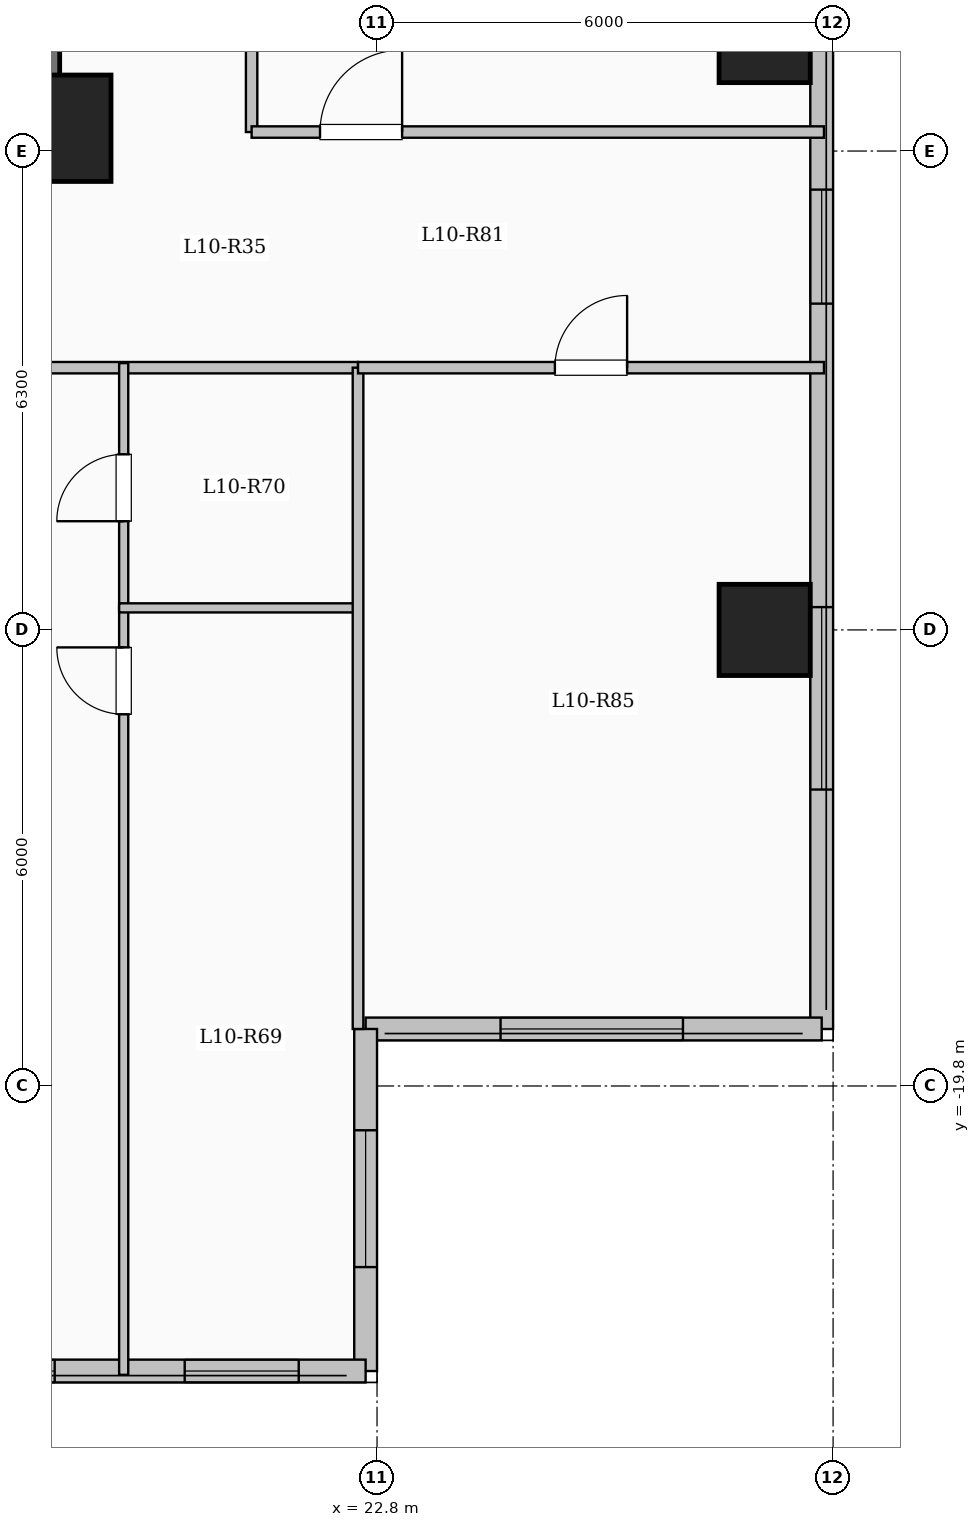
"""IFC4 building model, lengths in metres.
Left out: names, types, materials, properties, quantities, classifications, styles, units other than length and angle.
Written with IfcOpenShell. Run it as: python <this file> out.ifc"""

import sys

from ifc_helpers import new_model, si_unit, direction, frame, frame_2d, origin, origin_2d, place, context, subcontext, project, spatial, rectangle, extrude, element, fill, save


model = new_model("IFC4")
c1 = context("Model", 3, precision=1e-05, world=origin(), true_north=direction((0.0, 1.0)))
c2 = subcontext(c1, "Body", "Model", "MODEL_VIEW")
j1 = project(units=[si_unit("LENGTHUNIT", "METRE"), si_unit("PLANEANGLEUNIT", "RADIAN")], contexts=[c1])
p1 = place(None, origin())
s1 = spatial("IfcSite", under=j1, at=p1, CompositionType="ELEMENT")
p2 = place(p1, origin())
s2 = spatial("IfcBuilding", under=s1, at=p2, CompositionType="ELEMENT")
p3 = place(p2, frame((0.0, 0.0, 40.75)))
s3 = spatial("IfcBuildingStorey", under=s2, at=p3, CompositionType="ELEMENT", Elevation=40.75)
p4 = place(p3, frame((18.6, -7.2, 0.0), z_axis=(0.0, 0.0, 1.0), x_axis=(1.0, 0.0, 0.0)))
e1 = element("IfcColumn", 1, at=p4, inside=s3, PredefinedType="COLUMN", context=c2, shape_type="SweptSolid", body=[
    extrude(rectangle(XDim=1.4, YDim=1.4, at=origin_2d()), origin(), (0.0, 0.0, 1.0), 3.35),
])
for number, where, z_axis, x_axis in (
    (2, (27.9, -13.8, 0.0), (0.0, 0.0, 1.0), (1.0, 0.0, 0.0)),
    (3, (27.9, -6.0, 0.0), (0.0, 0.0, 1.0), (1.0, 0.0, 0.0)),
):
    element("IfcColumn", number, at=place(p3, frame(where, z_axis=z_axis, x_axis=x_axis)), inside=s3, PredefinedType="COLUMN", context=c2, shape_type="SweptSolid", body=[
        extrude(rectangle(XDim=1.2, YDim=1.2, at=origin_2d()), origin(), (0.0, 0.0, 1.0), 3.35),
    ])
p5 = place(p3, frame((28.65, 19.05, 0.0), z_axis=(0.0, 0.0, 1.0), x_axis=(0.0, -1.0, 0.0)))
e4 = element("IfcWall", 4, at=p5, inside=s3, PredefinedType="SOLIDWALL", context=c2, shape_type="SweptSolid", body=[
    extrude(rectangle(XDim=38.1, YDim=0.3, at=frame_2d((19.05, 0.0))), origin(), (0.0, 0.0, 1.0), 3.1),
])
p6 = place(p5, frame((2.275, 0.0, 0.9)))
e5 = element("IfcOpeningElement", 5, at=p6, cuts=e4, PredefinedType="OPENING", context=c2, shape_type="SweptSolid", body=[
    extrude(rectangle(XDim=2.0, YDim=1.7, at=frame_2d((1.0, 0.85))), frame((0.0, 0.16, 0.0), z_axis=(0.0, -1.0, 0.0), x_axis=(1.0, 0.0, 0.0)), (0.0, 0.0, 1.0), 0.32),
])
p7 = place(p5, frame((6.925, 0.0, 0.95)))
e6 = element("IfcOpeningElement", 6, at=p7, cuts=e4, PredefinedType="OPENING", context=c2, shape_type="SweptSolid", body=[
    extrude(rectangle(XDim=1.0, YDim=1.5, at=frame_2d((0.5, 0.75))), frame((0.0, 0.16, 0.0), z_axis=(0.0, -1.0, 0.0), x_axis=(1.0, 0.0, 0.0)), (0.0, 0.0, 1.0), 0.32),
])
p8 = place(p5, frame((16.3, 0.0, 0.9)))
e7 = element("IfcOpeningElement", 7, at=p8, cuts=e4, PredefinedType="OPENING", context=c2, shape_type="SweptSolid", body=[
    extrude(rectangle(XDim=2.0, YDim=1.7, at=frame_2d((1.0, 0.85))), frame((0.0, 0.16, 0.0), z_axis=(0.0, -1.0, 0.0), x_axis=(1.0, 0.0, 0.0)), (0.0, 0.0, 1.0), 0.32),
])
p9 = place(p5, frame((27.058, 0.0, 0.9)))
e8 = element("IfcOpeningElement", 8, at=p9, cuts=e4, PredefinedType="OPENING", context=c2, shape_type="SweptSolid", body=[
    extrude(rectangle(XDim=1.5, YDim=1.65, at=frame_2d((0.75, 0.825))), frame((0.0, 0.16, 0.0), z_axis=(0.0, -1.0, 0.0), x_axis=(1.0, 0.0, 0.0)), (0.0, 0.0, 1.0), 0.32),
])
p10 = place(p5, frame((32.55, 0.0, 0.9)))
e9 = element("IfcOpeningElement", 9, at=p10, cuts=e4, PredefinedType="OPENING", context=c2, shape_type="SweptSolid", body=[
    extrude(rectangle(XDim=2.4, YDim=1.8, at=frame_2d((1.2, 0.9))), frame((0.0, 0.16, 0.0), z_axis=(0.0, -1.0, 0.0), x_axis=(1.0, 0.0, 0.0)), (0.0, 0.0, 1.0), 0.32),
])
p11 = place(p3, frame((28.65, -19.05, 0.0), z_axis=(0.0, 0.0, 1.0), x_axis=(-1.0, 0.0, 0.0)))
e10 = element("IfcWall", 10, at=p11, inside=s3, PredefinedType="SOLIDWALL", context=c2, shape_type="SweptSolid", body=[
    extrude(rectangle(XDim=6.0, YDim=0.3, at=frame_2d((3.0, 0.0))), origin(), (0.0, 0.0, 1.0), 3.1),
])
p12 = place(p11, frame((1.825, 0.0, 0.9)))
e11 = element("IfcOpeningElement", 11, at=p12, cuts=e10, PredefinedType="OPENING", context=c2, shape_type="SweptSolid", body=[
    extrude(rectangle(XDim=2.4, YDim=1.8, at=frame_2d((1.2, 0.9))), frame((0.0, 0.16, 0.0), z_axis=(0.0, -1.0, 0.0), x_axis=(1.0, 0.0, 0.0)), (0.0, 0.0, 1.0), 0.32),
])
p13 = place(p3, frame((22.65, -19.05, 0.0), z_axis=(0.0, 0.0, 1.0), x_axis=(0.0, -1.0, 0.0)))
e12 = element("IfcWall", 12, at=p13, inside=s3, PredefinedType="SOLIDWALL", context=c2, shape_type="SweptSolid", body=[
    extrude(rectangle(XDim=4.5, YDim=0.3, at=frame_2d((2.25, 0.0))), origin(), (0.0, 0.0, 1.0), 3.1),
])
p14 = place(p13, frame((1.333, 0.0, 0.9)))
e13 = element("IfcOpeningElement", 13, at=p14, cuts=e12, PredefinedType="OPENING", context=c2, shape_type="SweptSolid", body=[
    extrude(rectangle(XDim=1.8, YDim=1.65, at=frame_2d((0.9, 0.825))), frame((0.0, 0.16, 0.0), z_axis=(0.0, -1.0, 0.0), x_axis=(1.0, 0.0, 0.0)), (0.0, 0.0, 1.0), 0.32),
])
p15 = place(p3, frame((22.65, -23.55, 0.0), z_axis=(0.0, 0.0, 1.0), x_axis=(-1.0, 0.0, 0.0)))
e14 = element("IfcWall", 14, at=p15, inside=s3, PredefinedType="SOLIDWALL", context=c2, shape_type="SweptSolid", body=[
    extrude(rectangle(XDim=15.3, YDim=0.3, at=frame_2d((7.65, 0.0))), origin(), (0.0, 0.0, 1.0), 3.1),
])
p16 = place(p15, frame((0.88, 0.0, 0.9)))
e15 = element("IfcOpeningElement", 15, at=p16, cuts=e14, PredefinedType="OPENING", context=c2, shape_type="SweptSolid", body=[
    extrude(rectangle(XDim=1.5, YDim=1.65, at=frame_2d((0.75, 0.825))), frame((0.0, 0.16, 0.0), z_axis=(0.0, -1.0, 0.0), x_axis=(1.0, 0.0, 0.0)), (0.0, 0.0, 1.0), 0.32),
])
p17 = place(p15, frame((4.091, 0.0, 0.9)))
e16 = element("IfcOpeningElement", 16, at=p17, cuts=e14, PredefinedType="OPENING", context=c2, shape_type="SweptSolid", body=[
    extrude(rectangle(XDim=1.5, YDim=1.65, at=frame_2d((0.75, 0.825))), frame((0.0, 0.16, 0.0), z_axis=(0.0, -1.0, 0.0), x_axis=(1.0, 0.0, 0.0)), (0.0, 0.0, 1.0), 0.32),
])
p18 = place(p15, frame((7.045, 0.0, 0.95)))
e17 = element("IfcOpeningElement", 17, at=p18, cuts=e14, PredefinedType="OPENING", context=c2, shape_type="SweptSolid", body=[
    extrude(rectangle(XDim=1.2, YDim=1.5, at=frame_2d((0.6, 0.75))), frame((0.0, 0.16, 0.0), z_axis=(0.0, -1.0, 0.0), x_axis=(1.0, 0.0, 0.0)), (0.0, 0.0, 1.0), 0.32),
])
p19 = place(p15, frame((9.212, 0.0, 0.95)))
e18 = element("IfcOpeningElement", 18, at=p19, cuts=e14, PredefinedType="OPENING", context=c2, shape_type="SweptSolid", body=[
    extrude(rectangle(XDim=1.2, YDim=1.5, at=frame_2d((0.6, 0.75))), frame((0.0, 0.16, 0.0), z_axis=(0.0, -1.0, 0.0), x_axis=(1.0, 0.0, 0.0)), (0.0, 0.0, 1.0), 0.32),
])
p20 = place(p15, frame((11.741, 0.0, 0.9)))
e19 = element("IfcOpeningElement", 19, at=p20, cuts=e14, PredefinedType="OPENING", context=c2, shape_type="SweptSolid", body=[
    extrude(rectangle(XDim=1.5, YDim=1.65, at=frame_2d((0.75, 0.825))), frame((0.0, 0.16, 0.0), z_axis=(0.0, -1.0, 0.0), x_axis=(1.0, 0.0, 0.0)), (0.0, 0.0, 1.0), 0.32),
])
p21 = place(p15, frame((14.303, 0.0, 0.95)))
e20 = element("IfcOpeningElement", 20, at=p21, cuts=e14, PredefinedType="OPENING", context=c2, shape_type="SweptSolid", body=[
    extrude(rectangle(XDim=0.85, YDim=1.5, at=frame_2d((0.425, 0.75))), frame((0.0, 0.16, 0.0), z_axis=(0.0, -1.0, 0.0), x_axis=(1.0, 0.0, 0.0)), (0.0, 0.0, 1.0), 0.32),
])
p22 = place(p3, frame((18.45, -7.375, 0.0), z_axis=(0.0, 0.0, 1.0), x_axis=(0.0, 1.0, 0.0)))
e21 = element("IfcWall", 21, at=p22, inside=s3, PredefinedType="SHEAR", context=c2, shape_type="SweptSolid", body=[
    extrude(rectangle(XDim=14.05, YDim=0.35, at=frame_2d((7.025, 0.0))), origin(), (0.0, 0.0, 1.0), 3.35),
])
p23 = place(p3, frame((10.075, -7.2, 0.0), z_axis=(0.0, 0.0, 1.0), x_axis=(1.0, 0.0, 0.0)))
e22 = element("IfcWall", 22, at=p23, inside=s3, PredefinedType="SHEAR", context=c2, shape_type="SweptSolid", body=[
    extrude(rectangle(XDim=8.55, YDim=0.35, at=frame_2d((4.275, 0.0))), origin(), (0.0, 0.0, 1.0), 3.35),
])
p24 = place(p3, frame((21.15, -7.25, 0.0), z_axis=(0.0, 0.0, 1.0), x_axis=(0.0, 1.0, 0.0)))
e23 = element("IfcWall", 23, at=p24, inside=s3, PredefinedType="PARTITIONING", context=c2, shape_type="SweptSolid", body=[
    extrude(rectangle(XDim=18.0, YDim=0.15, at=frame_2d((9.0, 0.0))), origin(), (0.0, 0.0, 1.0), 2.585),
])
p25 = place(p3, frame((8.55, -10.35, 0.0), z_axis=(0.0, 0.0, 1.0), x_axis=(1.0, 0.0, 0.0)))
e24 = element("IfcWall", 24, at=p25, inside=s3, PredefinedType="PARTITIONING", context=c2, shape_type="SweptSolid", body=[
    extrude(rectangle(XDim=14.0, YDim=0.15, at=frame_2d((7.0, 0.0))), origin(), (0.0, 0.0, 1.0), 3.1),
])
p26 = place(p25, frame((0.75, 0.0, 0.0)))
e25 = element("IfcOpeningElement", 25, at=p26, cuts=e24, PredefinedType="OPENING", context=c2, shape_type="SweptSolid", body=[
    extrude(rectangle(XDim=0.96, YDim=2.15, at=frame_2d((0.48, 1.075))), frame((0.0, 0.085, 0.0), z_axis=(0.0, -1.0, 0.0), x_axis=(1.0, 0.0, 0.0)), (0.0, 0.0, 1.0), 0.17),
])
p27 = place(p25, frame((8.283, 0.0, 0.0)))
e26 = element("IfcOpeningElement", 26, at=p27, cuts=e24, PredefinedType="OPENING", context=c2, shape_type="SweptSolid", body=[
    extrude(rectangle(XDim=0.96, YDim=2.15, at=frame_2d((0.48, 1.075))), frame((0.0, 0.085, 0.0), z_axis=(0.0, -1.0, 0.0), x_axis=(1.0, 0.0, 0.0)), (0.0, 0.0, 1.0), 0.17),
])
p28 = place(p3, frame((19.467, -23.6, 0.0), z_axis=(0.0, 0.0, 1.0), x_axis=(0.0, 1.0, 0.0)))
e27 = element("IfcWall", 27, at=p28, inside=s3, PredefinedType="PARTITIONING", context=c2, shape_type="SweptSolid", body=[
    extrude(rectangle(XDim=10.09, YDim=0.12, at=frame_2d((5.045, 0.0))), origin(), (0.0, 0.0, 1.0), 3.1),
])
p29 = place(p28, frame((8.69, 0.0, 0.0)))
e28 = element("IfcOpeningElement", 28, at=p29, cuts=e27, PredefinedType="OPENING", context=c2, shape_type="SweptSolid", body=[
    extrude(rectangle(XDim=0.88, YDim=2.1, at=frame_2d((0.44, 1.05))), frame((0.0, 0.07, 0.0), z_axis=(0.0, -1.0, 0.0), x_axis=(1.0, 0.0, 0.0)), (0.0, 0.0, 1.0), 0.14),
])
p30 = place(p3, frame((19.467, -13.51, 0.0), z_axis=(0.0, 0.0, 1.0), x_axis=(0.0, 1.0, 0.0)))
e29 = element("IfcWall", 29, at=p30, inside=s3, PredefinedType="PARTITIONING", context=c2, shape_type="SweptSolid", body=[
    extrude(rectangle(XDim=3.22, YDim=0.12, at=frame_2d((1.61, 0.0))), origin(), (0.0, 0.0, 1.0), 3.1),
])
p31 = place(p30, frame((1.14, 0.0, 0.0)))
e30 = element("IfcOpeningElement", 30, at=p31, cuts=e29, PredefinedType="OPENING", context=c2, shape_type="SweptSolid", body=[
    extrude(rectangle(XDim=0.88, YDim=2.1, at=frame_2d((0.44, 1.05))), frame((0.0, 0.07, 0.0), z_axis=(0.0, -1.0, 0.0), x_axis=(1.0, 0.0, 0.0)), (0.0, 0.0, 1.0), 0.14),
])
p32 = place(p3, frame((19.407, -13.51, 0.0), z_axis=(0.0, 0.0, 1.0), x_axis=(1.0, 0.0, 0.0)))
e31 = element("IfcWall", 31, at=p32, inside=s3, PredefinedType="PARTITIONING", context=c2, shape_type="SweptSolid", body=[
    extrude(rectangle(XDim=3.203, YDim=0.12, at=frame_2d((1.602, 0.0))), origin(), (0.0, 0.0, 1.0), 3.1),
])
p33 = place(p3, frame((21.15, -7.25, 0.0), z_axis=(0.0, 0.0, 1.0), x_axis=(1.0, 0.0, 0.0)))
e32 = element("IfcWall", 32, at=p33, inside=s3, PredefinedType="PARTITIONING", context=c2, shape_type="SweptSolid", body=[
    extrude(rectangle(XDim=7.53, YDim=0.15, at=frame_2d((3.765, 0.0))), origin(), (0.0, 0.0, 1.0), 3.1),
])
p34 = place(p33, frame((0.9, 0.0, 0.0)))
e33 = element("IfcOpeningElement", 33, at=p34, cuts=e32, PredefinedType="OPENING", context=c2, shape_type="SweptSolid", body=[
    extrude(rectangle(XDim=1.08, YDim=2.15, at=frame_2d((0.54, 1.075))), frame((0.0, 0.085, 0.0), z_axis=(0.0, -1.0, 0.0), x_axis=(1.0, 0.0, 0.0)), (0.0, 0.0, 1.0), 0.17),
])
p35 = place(p3, frame((22.55, -19.05, 0.0), z_axis=(0.0, 0.0, 1.0), x_axis=(0.0, 1.0, 0.0)))
e34 = element("IfcWall", 34, at=p35, inside=s3, PredefinedType="PARTITIONING", context=c2, shape_type="SweptSolid", body=[
    extrude(rectangle(XDim=8.7, YDim=0.14, at=frame_2d((4.35, 0.0))), origin(), (0.0, 0.0, 1.0), 3.1),
])
p36 = place(p3, frame((22.55, -10.35, 0.0), z_axis=(0.0, 0.0, 1.0), x_axis=(1.0, 0.0, 0.0)))
e35 = element("IfcWall", 35, at=p36, inside=s3, PredefinedType="PARTITIONING", context=c2, shape_type="SweptSolid", body=[
    extrude(rectangle(XDim=6.13, YDim=0.15, at=frame_2d((3.065, 0.0))), origin(), (0.0, 0.0, 1.0), 3.1),
])
p37 = place(p36, frame((2.59, 0.0, 0.0)))
e36 = element("IfcOpeningElement", 36, at=p37, cuts=e35, PredefinedType="OPENING", context=c2, shape_type="SweptSolid", body=[
    extrude(rectangle(XDim=0.95, YDim=2.15, at=frame_2d((0.475, 1.075))), frame((0.0, 0.085, 0.0), z_axis=(0.0, -1.0, 0.0), x_axis=(1.0, 0.0, 0.0)), (0.0, 0.0, 1.0), 0.17),
])
p38 = place(p9, origin())
e37 = element("IfcWindow", 37, at=p38, inside=s3, PartitioningType="SINGLE_PANEL", PredefinedType="WINDOW", context=c2, shape_type="SweptSolid", body=[
    extrude(rectangle(XDim=1.5, YDim=1.65, at=frame_2d((0.75, 0.825))), frame((0.0, 0.03, 0.0), z_axis=(0.0, -1.0, 0.0), x_axis=(1.0, 0.0, 0.0)), (0.0, 0.0, 1.0), 0.06),
])
fill(e8, e37)
p39 = place(p10, origin())
e38 = element("IfcWindow", 38, at=p39, inside=s3, PartitioningType="SINGLE_PANEL", PredefinedType="WINDOW", context=c2, shape_type="SweptSolid", body=[
    extrude(rectangle(XDim=2.4, YDim=1.8, at=frame_2d((1.2, 0.9))), frame((0.0, 0.03, 0.0), z_axis=(0.0, -1.0, 0.0), x_axis=(1.0, 0.0, 0.0)), (0.0, 0.0, 1.0), 0.06),
])
fill(e9, e38)
p40 = place(p12, origin())
e39 = element("IfcWindow", 39, at=p40, inside=s3, PartitioningType="SINGLE_PANEL", PredefinedType="WINDOW", context=c2, shape_type="SweptSolid", body=[
    extrude(rectangle(XDim=2.4, YDim=1.8, at=frame_2d((1.2, 0.9))), frame((0.0, 0.03, 0.0), z_axis=(0.0, -1.0, 0.0), x_axis=(1.0, 0.0, 0.0)), (0.0, 0.0, 1.0), 0.06),
])
fill(e11, e39)
p41 = place(p14, origin())
e40 = element("IfcWindow", 40, at=p41, inside=s3, PartitioningType="SINGLE_PANEL", PredefinedType="WINDOW", context=c2, shape_type="SweptSolid", body=[
    extrude(rectangle(XDim=1.8, YDim=1.65, at=frame_2d((0.9, 0.825))), frame((0.0, 0.03, 0.0), z_axis=(0.0, -1.0, 0.0), x_axis=(1.0, 0.0, 0.0)), (0.0, 0.0, 1.0), 0.06),
])
fill(e13, e40)
p42 = place(p16, origin())
e41 = element("IfcWindow", 41, at=p42, inside=s3, PartitioningType="SINGLE_PANEL", PredefinedType="WINDOW", context=c2, shape_type="SweptSolid", body=[
    extrude(rectangle(XDim=1.5, YDim=1.65, at=frame_2d((0.75, 0.825))), frame((0.0, 0.03, 0.0), z_axis=(0.0, -1.0, 0.0), x_axis=(1.0, 0.0, 0.0)), (0.0, 0.0, 1.0), 0.06),
])
fill(e15, e41)
p43 = place(p17, origin())
e42 = element("IfcWindow", 42, at=p43, inside=s3, PartitioningType="SINGLE_PANEL", PredefinedType="WINDOW", context=c2, shape_type="SweptSolid", body=[
    extrude(rectangle(XDim=1.5, YDim=1.65, at=frame_2d((0.75, 0.825))), frame((0.0, 0.03, 0.0), z_axis=(0.0, -1.0, 0.0), x_axis=(1.0, 0.0, 0.0)), (0.0, 0.0, 1.0), 0.06),
])
fill(e16, e42)
p44 = place(p29, origin())
e43 = element("IfcDoor", 43, at=p44, inside=s3, OperationType="SINGLE_SWING_RIGHT", PredefinedType="DOOR", context=c2, shape_type="SweptSolid", body=[
    extrude(rectangle(XDim=0.88, YDim=2.1, at=frame_2d((0.44, 1.05))), frame((0.0, 0.025, 0.0), z_axis=(0.0, -1.0, 0.0), x_axis=(1.0, 0.0, 0.0)), (0.0, 0.0, 1.0), 0.05),
])
fill(e28, e43)
p45 = place(p31, origin())
e44 = element("IfcDoor", 44, at=p45, inside=s3, OperationType="SINGLE_SWING_LEFT", PredefinedType="DOOR", context=c2, shape_type="SweptSolid", body=[
    extrude(rectangle(XDim=0.88, YDim=2.1, at=frame_2d((0.44, 1.05))), frame((0.0, 0.025, 0.0), z_axis=(0.0, -1.0, 0.0), x_axis=(1.0, 0.0, 0.0)), (0.0, 0.0, 1.0), 0.05),
])
fill(e30, e44)
p46 = place(p37, origin())
e45 = element("IfcDoor", 45, at=p46, inside=s3, OperationType="SINGLE_SWING_RIGHT", PredefinedType="DOOR", context=c2, shape_type="SweptSolid", body=[
    extrude(rectangle(XDim=0.95, YDim=2.15, at=frame_2d((0.475, 1.075))), frame((0.0, 0.025, 0.0), z_axis=(0.0, -1.0, 0.0), x_axis=(1.0, 0.0, 0.0)), (0.0, 0.0, 1.0), 0.05),
])
fill(e36, e45)
p47 = place(p34, origin())
e46 = element("IfcDoor", 46, at=p47, inside=s3, OperationType="SINGLE_SWING_RIGHT", PredefinedType="DOOR", context=c2, shape_type="SweptSolid", body=[
    extrude(rectangle(XDim=1.08, YDim=2.15, at=frame_2d((0.54, 1.075))), frame((0.0, 0.025, 0.0), z_axis=(0.0, -1.0, 0.0), x_axis=(1.0, 0.0, 0.0)), (0.0, 0.0, 1.0), 0.05),
])
fill(e33, e46)
save(model, sys.argv[1])
